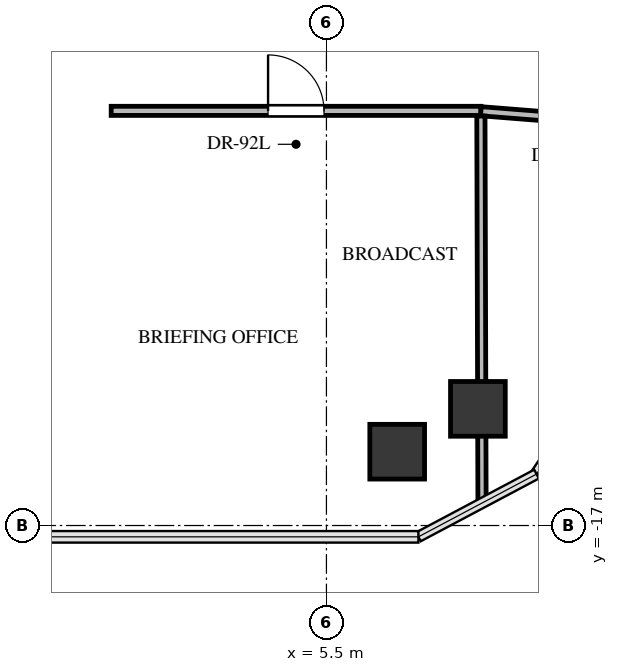
"""IFC4 building model, lengths in metres.
Left out: names, types, materials, properties, quantities, classifications, styles, units other than length and angle.
Written with IfcOpenShell. Run it as: python <this file> out.ifc"""

import sys

from ifc_helpers import new_model, si_unit, direction, frame, frame_2d, origin, origin_2d, place, context, subcontext, project, spatial, rectangle, extrude, source, transform, mapped, element, fill, save


model = new_model("IFC4")
c1 = context("Model", 3, precision=1e-05, world=origin(), true_north=direction((0.0, 1.0)))
c2 = subcontext(c1, "Body", "Model", "MODEL_VIEW")
j1 = project(units=[si_unit("LENGTHUNIT", "METRE"), si_unit("PLANEANGLEUNIT", "RADIAN")], contexts=[c1])
p1 = place(None, origin())
s1 = spatial("IfcSite", under=j1, at=p1, CompositionType="ELEMENT")
p2 = place(p1, origin())
s2 = spatial("IfcBuilding", under=s1, at=p2, CompositionType="ELEMENT")
p3 = place(p2, frame((0.0, 0.0, 228.2)))
s3 = spatial("IfcBuildingStorey", under=s2, at=p3, CompositionType="ELEMENT", Elevation=228.2)
m1 = source(origin(), c2, "Body", "SweptSolid", [
    extrude(rectangle(XDim=0.9, YDim=0.9, at=origin_2d()), origin(), (0.0, 0.0, 1.0), 3.3),
])
for number, where, z_axis, x_axis in (
    (1, (7.991, -15.081, -0.24), (0.0, 0.0, 1.0), (1.0, 0.0, 0.0)),
    (2, (6.664, -15.786, -0.24), (0.0, 0.0, 1.0), (1.0, 0.0, 0.0)),
):
    element("IfcColumn", number, at=place(p3, frame(where, z_axis=z_axis, x_axis=x_axis)), inside=s3, PredefinedType="COLUMN", context=c2, shape_type="MappedRepresentation", body=[
        mapped(m1, transform((0.0, 0.0, 0.0), x_axis=(1.0, 0.0, 0.0), y_axis=(0.0, 1.0, 0.0), z_axis=(0.0, 0.0, 1.0), scale=1.0)),
    ])
p4 = place(p3, frame((1.96, -10.18, 0.0), z_axis=(0.0, 0.0, 1.0), x_axis=(1.0, 0.0, 0.0)))
e3 = element("IfcWall", 3, at=p4, inside=s3, PredefinedType="PARTITIONING", context=c2, shape_type="SweptSolid", body=[
    extrude(rectangle(XDim=6.08, YDim=0.15, at=frame_2d((3.04, 0.0))), origin(), (0.0, 0.0, 1.0), 2.301),
])
p5 = place(p4, frame((2.58, 0.0, 0.0)))
e4 = element("IfcOpeningElement", 4, at=p5, cuts=e3, PredefinedType="OPENING", context=c2, shape_type="SweptSolid", body=[
    extrude(rectangle(XDim=0.92, YDim=2.1, at=frame_2d((0.46, 1.05))), frame((0.0, 0.085, 0.0), z_axis=(0.0, -1.0, 0.0), x_axis=(1.0, 0.0, 0.0)), (0.0, 0.0, 1.0), 0.17),
])
p6 = place(p3, frame((8.04, -10.186, 0.0), z_axis=(0.0, 0.0, 1.0), x_axis=(0.996887981077, -0.078831168868, 0.0)))
e5 = element("IfcWall", 5, at=p6, inside=s3, PredefinedType="PARTITIONING", context=c2, shape_type="SweptSolid", body=[
    extrude(rectangle(XDim=4.714, YDim=0.15, at=frame_2d((2.357, 0.0))), origin(), (0.0, 0.0, 1.0), 2.399),
])
p7 = place(p6, frame((1.882, 0.0, 0.0)))
e6 = element("IfcOpeningElement", 6, at=p7, cuts=e5, PredefinedType="OPENING", context=c2, shape_type="SweptSolid", body=[
    extrude(rectangle(XDim=0.95, YDim=2.1, at=frame_2d((0.475, 1.05))), frame((0.0, 0.085, 0.0), z_axis=(0.0, -1.0, 0.0), x_axis=(1.0, 0.0, 0.0)), (0.0, 0.0, 1.0), 0.17),
])
p8 = place(p3, frame((8.04, -10.266, 0.0), z_axis=(0.0, 0.0, 1.0), x_axis=(0.002906673097, -0.999995775617, 0.0)))
e7 = element("IfcWall", 7, at=p8, inside=s3, PredefinedType="PARTITIONING", context=c2, shape_type="SweptSolid", body=[
    extrude(rectangle(XDim=4.872, YDim=0.135, at=frame_2d((2.436, 0.0))), origin(), (0.0, 0.0, 1.0), 1.877),
])
p9 = place(p3, frame((8.055, -15.478, 0.0), z_axis=(0.0, 0.0, 1.0), x_axis=(0.002965460378, -0.999995603013, 0.0)))
e8 = element("IfcWall", 8, at=p9, inside=s3, PredefinedType="PARTITIONING", context=c2, shape_type="SweptSolid", body=[
    extrude(rectangle(XDim=1.153, YDim=0.135, at=frame_2d((0.576, 0.0))), origin(), (0.0, 0.0, 1.0), 3.045),
])
p10 = place(p3, frame((8.054, -15.137, 0.0), z_axis=(0.0, 0.0, 1.0), x_axis=(0.002867371725, -0.999995889081, 0.0)))
e9 = element("IfcWall", 9, at=p10, inside=s3, PredefinedType="PARTITIONING", context=c2, shape_type="SweptSolid", body=[
    extrude(rectangle(XDim=0.341, YDim=0.135, at=frame_2d((0.17, 0.0))), origin(), (0.0, 0.0, 1.0), 1.877),
])
m2 = source(origin(), c2, "Body", "SweptSolid", [
    extrude(rectangle(XDim=0.92, YDim=2.1, at=frame_2d((0.46, 1.05))), frame((0.0, 0.025, 0.0), z_axis=(0.0, -1.0, 0.0), x_axis=(1.0, 0.0, 0.0)), (0.0, 0.0, 1.0), 0.05),
])
p11 = place(p5, origin())
e10 = element("IfcDoor", 10, at=p11, inside=s3, OperationType="SINGLE_SWING_LEFT", PredefinedType="DOOR", context=c2, shape_type="MappedRepresentation", body=[
    mapped(m2, transform((0.0, 0.0, 0.0), x_axis=(1.0, 0.0, 0.0), y_axis=(0.0, 1.0, 0.0), z_axis=(0.0, 0.0, 1.0), scale=1.0)),
])
fill(e4, e10)
save(model, sys.argv[1])
